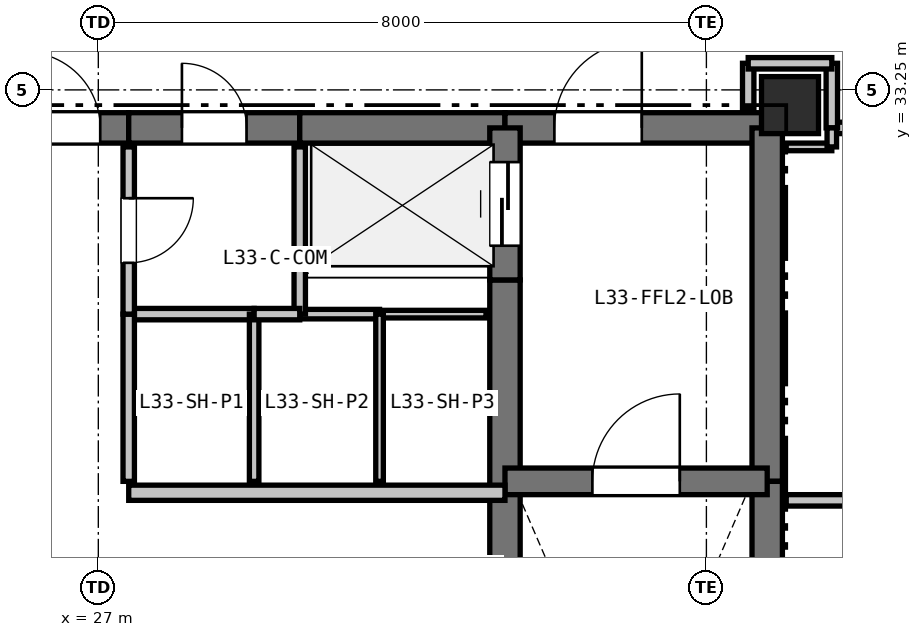
"""IFC4 building model, lengths in metres.
Left out: names, types, materials, properties, quantities, classifications, styles, units other than length and angle.
Written with IfcOpenShell. Run it as: python <this file> out.ifc"""

import sys

from ifc_helpers import new_model, si_unit, direction, frame, frame_2d, origin, origin_2d, place, context, subcontext, project, spatial, rectangle, extrude, element, fill, save


model = new_model("IFC4")
c1 = context("Model", 3, precision=1e-05, world=origin(), true_north=direction((0.0, 1.0)))
c2 = subcontext(c1, "Body", "Model", "MODEL_VIEW")
j1 = project(units=[si_unit("LENGTHUNIT", "METRE"), si_unit("PLANEANGLEUNIT", "RADIAN")], contexts=[c1])
p1 = place(None, origin())
s1 = spatial("IfcSite", under=j1, at=p1, CompositionType="ELEMENT")
p2 = place(p1, origin())
s2 = spatial("IfcBuilding", under=s1, at=p2, CompositionType="ELEMENT")
p3 = place(p2, frame((0.0, 0.0, 121.2)))
s3 = spatial("IfcBuildingStorey", under=s2, at=p3, CompositionType="ELEMENT", Elevation=121.2)
p4 = place(p3, frame((36.1, 33.05, 0.0), z_axis=(0.0, 0.0, 1.0), x_axis=(1.0, 0.0, 0.0)))
e1 = element("IfcColumn", 1, at=p4, inside=s3, PredefinedType="COLUMN", context=c2, shape_type="SweptSolid", body=[
    extrude(rectangle(XDim=0.75, YDim=0.75, at=origin_2d()), origin(), (0.0, 0.0, 1.0), 3.3),
])
p5 = place(p3, frame((25.65, 32.75, 0.0), z_axis=(0.0, 0.0, 1.0), x_axis=(1.0, 0.0, 0.0)))
e2 = element("IfcWall", 2, at=p5, inside=s3, PredefinedType="SHEAR", context=c2, shape_type="SweptSolid", body=[
    extrude(rectangle(XDim=1.75, YDim=0.4, at=frame_2d((0.875, 0.0))), origin(), (0.0, 0.0, 1.0), 3.06),
])
p6 = place(p5, frame((0.375, 0.0, 0.0)))
e3 = element("IfcOpeningElement", 3, at=p6, cuts=e2, PredefinedType="OPENING", context=c2, shape_type="SweptSolid", body=[
    extrude(rectangle(XDim=1.0, YDim=2.15, at=frame_2d((0.5, 1.075))), frame((0.0, 0.21, 0.0), z_axis=(0.0, -1.0, 0.0), x_axis=(1.0, 0.0, 0.0)), (0.0, 0.0, 1.0), 0.42),
])
p7 = place(p3, frame((27.4, 32.75, 0.0), z_axis=(0.0, 0.0, 1.0), x_axis=(1.0, 0.0, 0.0)))
e4 = element("IfcWall", 4, at=p7, inside=s3, PredefinedType="SHEAR", context=c2, shape_type="SweptSolid", body=[
    extrude(rectangle(XDim=2.25, YDim=0.4, at=frame_2d((1.125, 0.0))), origin(), (0.0, 0.0, 1.0), 3.06),
])
p8 = place(p7, frame((0.7, 0.0, 0.0)))
e5 = element("IfcOpeningElement", 5, at=p8, cuts=e4, PredefinedType="OPENING", context=c2, shape_type="SweptSolid", body=[
    extrude(rectangle(XDim=0.85, YDim=2.1, at=frame_2d((0.425, 1.05))), frame((0.0, 0.21, 0.0), z_axis=(0.0, -1.0, 0.0), x_axis=(1.0, 0.0, 0.0)), (0.0, 0.0, 1.0), 0.42),
])
p9 = place(p3, frame((29.65, 32.75, 0.0), z_axis=(0.0, 0.0, 1.0), x_axis=(1.0, 0.0, 0.0)))
e6 = element("IfcWall", 6, at=p9, inside=s3, PredefinedType="SHEAR", context=c2, shape_type="SweptSolid", body=[
    extrude(rectangle(XDim=2.7, YDim=0.4, at=frame_2d((1.35, 0.0))), origin(), (0.0, 0.0, 1.0), 3.06),
])
p10 = place(p3, frame((32.35, 32.75, 0.0), z_axis=(0.0, 0.0, 1.0), x_axis=(1.0, 0.0, 0.0)))
e7 = element("IfcWall", 7, at=p10, inside=s3, PredefinedType="SHEAR", context=c2, shape_type="SweptSolid", body=[
    extrude(rectangle(XDim=3.45, YDim=0.4, at=frame_2d((1.725, 0.0))), origin(), (0.0, 0.0, 1.0), 3.06),
])
p11 = place(p10, frame((0.65, 0.0, 0.0)))
e8 = element("IfcOpeningElement", 8, at=p11, cuts=e7, PredefinedType="OPENING", context=c2, shape_type="SweptSolid", body=[
    extrude(rectangle(XDim=1.15, YDim=2.15, at=frame_2d((0.575, 1.075))), frame((0.0, 0.21, 0.0), z_axis=(0.0, -1.0, 0.0), x_axis=(1.0, 0.0, 0.0)), (0.0, 0.0, 1.0), 0.42),
])
p12 = place(p3, frame((35.8, 32.75, 0.0), z_axis=(0.0, 0.0, 1.0), x_axis=(0.0, -1.0, 0.0)))
e9 = element("IfcWall", 9, at=p12, inside=s3, PredefinedType="SHEAR", context=c2, shape_type="SweptSolid", body=[
    extrude(rectangle(XDim=4.65, YDim=0.4, at=frame_2d((2.325, 0.0))), origin(), (0.0, 0.0, 1.0), 3.06),
])
p13 = place(p3, frame((35.8, 28.1, 0.0), z_axis=(0.0, 0.0, 1.0), x_axis=(0.0, -1.0, 0.0)))
e10 = element("IfcWall", 10, at=p13, inside=s3, PredefinedType="SHEAR", context=c2, shape_type="SweptSolid", body=[
    extrude(rectangle(XDim=7.35, YDim=0.4, at=frame_2d((3.675, 0.0))), origin(), (0.0, 0.0, 1.0), 3.06),
])
p14 = place(p3, frame((32.35, 25.55, 0.0), z_axis=(0.0, 0.0, 1.0), x_axis=(0.0, 1.0, 0.0)))
e11 = element("IfcWall", 11, at=p14, inside=s3, PredefinedType="SHEAR", context=c2, shape_type="SweptSolid", body=[
    extrude(rectangle(XDim=2.4, YDim=0.4, at=frame_2d((1.2, 0.0))), origin(), (0.0, 0.0, 1.0), 3.06),
])
p15 = place(p3, frame((32.35, 27.95, 0.0), z_axis=(0.0, 0.0, 1.0), x_axis=(0.0, 1.0, 0.0)))
e12 = element("IfcWall", 12, at=p15, inside=s3, PredefinedType="SHEAR", context=c2, shape_type="SweptSolid", body=[
    extrude(rectangle(XDim=2.8, YDim=0.4, at=frame_2d((1.4, 0.0))), origin(), (0.0, 0.0, 1.0), 3.06),
])
p16 = place(p3, frame((32.35, 30.75, 0.0), z_axis=(0.0, 0.0, 1.0), x_axis=(0.0, 1.0, 0.0)))
e13 = element("IfcWall", 13, at=p16, inside=s3, PredefinedType="SHEAR", context=c2, shape_type="SweptSolid", body=[
    extrude(rectangle(XDim=2.0, YDim=0.4, at=frame_2d((1.0, 0.0))), origin(), (0.0, 0.0, 1.0), 3.06),
])
p17 = place(p16, frame((0.45, 0.0, 0.0)))
e14 = element("IfcOpeningElement", 14, at=p17, cuts=e13, PredefinedType="OPENING", context=c2, shape_type="SweptSolid", body=[
    extrude(rectangle(XDim=1.1, YDim=2.15, at=frame_2d((0.55, 1.075))), frame((0.0, 0.21, 0.0), z_axis=(0.0, -1.0, 0.0), x_axis=(1.0, 0.0, 0.0)), (0.0, 0.0, 1.0), 0.42),
])
p18 = place(p3, frame((32.35, 28.1, 0.0), z_axis=(0.0, 0.0, 1.0), x_axis=(1.0, 0.0, 0.0)))
e15 = element("IfcWall", 15, at=p18, inside=s3, PredefinedType="SHEAR", context=c2, shape_type="SweptSolid", body=[
    extrude(rectangle(XDim=3.45, YDim=0.35, at=frame_2d((1.725, 0.0))), origin(), (0.0, 0.0, 1.0), 3.06),
])
p19 = place(p18, frame((1.15, 0.0, 0.0)))
e16 = element("IfcOpeningElement", 16, at=p19, cuts=e15, PredefinedType="OPENING", context=c2, shape_type="SweptSolid", body=[
    extrude(rectangle(XDim=1.15, YDim=2.15, at=frame_2d((0.575, 1.075))), frame((0.0, 0.185, 0.0), z_axis=(0.0, -1.0, 0.0), x_axis=(1.0, 0.0, 0.0)), (0.0, 0.0, 1.0), 0.37),
])
p20 = place(p3, frame((27.4, 27.95, 0.0), z_axis=(0.0, 0.0, 1.0), x_axis=(1.0, 0.0, 0.0)))
e17 = element("IfcWall", 17, at=p20, inside=s3, PredefinedType="PARTITIONING", context=c2, shape_type="SweptSolid", body=[
    extrude(rectangle(XDim=4.95, YDim=0.2, at=frame_2d((2.475, 0.0))), origin(), (0.0, 0.0, 1.0), 3.06),
])
p21 = place(p3, frame((32.1, 30.3, 0.0), z_axis=(0.0, 0.0, 1.0), x_axis=(-1.0, 0.0, 0.0)))
e18 = element("IfcWall", 18, at=p21, inside=s3, PredefinedType="PARTITIONING", context=c2, shape_type="SweptSolid", body=[
    extrude(rectangle(XDim=1.4, YDim=0.1, at=frame_2d((0.7, 0.0))), origin(), (0.0, 0.0, 1.0), 3.06),
])
p22 = place(p3, frame((30.7, 30.3, 0.0), z_axis=(0.0, 0.0, 1.0), x_axis=(-1.0, 0.0, 0.0)))
e19 = element("IfcWall", 19, at=p22, inside=s3, PredefinedType="PARTITIONING", context=c2, shape_type="SweptSolid", body=[
    extrude(rectangle(XDim=1.05, YDim=0.125, at=frame_2d((0.525, 0.0))), origin(), (0.0, 0.0, 1.0), 3.06),
])
p23 = place(p3, frame((29.65, 30.3, 0.0), z_axis=(0.0, 0.0, 1.0), x_axis=(0.0, 1.0, 0.0)))
e20 = element("IfcWall", 20, at=p23, inside=s3, PredefinedType="PARTITIONING", context=c2, shape_type="SweptSolid", body=[
    extrude(rectangle(XDim=2.2, YDim=0.15, at=frame_2d((1.1, 0.0))), origin(), (0.0, 0.0, 1.0), 3.06),
])
p24 = place(p3, frame((27.4, 30.3, 0.0), z_axis=(0.0, 0.0, 1.0), x_axis=(1.0, 0.0, 0.0)))
e21 = element("IfcWall", 21, at=p24, inside=s3, PredefinedType="PARTITIONING", context=c2, shape_type="SweptSolid", body=[
    extrude(rectangle(XDim=1.65, YDim=0.15, at=frame_2d((0.825, 0.0))), origin(), (0.0, 0.0, 1.0), 3.06),
])
p25 = place(p3, frame((29.05, 30.3, 0.0), z_axis=(0.0, 0.0, 1.0), x_axis=(0.0, -1.0, 0.0)))
e22 = element("IfcWall", 22, at=p25, inside=s3, PredefinedType="PARTITIONING", context=c2, shape_type="SweptSolid", body=[
    extrude(rectangle(XDim=2.2, YDim=0.125, at=frame_2d((1.1, 0.0))), origin(), (0.0, 0.0, 1.0), 3.06),
])
p26 = place(p3, frame((27.4, 28.1, 0.0), z_axis=(0.0, 0.0, 1.0), x_axis=(0.0, 1.0, 0.0)))
e23 = element("IfcWall", 23, at=p26, inside=s3, PredefinedType="PARTITIONING", context=c2, shape_type="SweptSolid", body=[
    extrude(rectangle(XDim=2.2, YDim=0.15, at=frame_2d((1.1, 0.0))), origin(), (0.0, 0.0, 1.0), 3.06),
])
p27 = place(p3, frame((29.05, 30.3, 0.0), z_axis=(0.0, 0.0, 1.0), x_axis=(1.0, 0.0, 0.0)))
e24 = element("IfcWall", 24, at=p27, inside=s3, PredefinedType="PARTITIONING", context=c2, shape_type="SweptSolid", body=[
    extrude(rectangle(XDim=0.6, YDim=0.15, at=frame_2d((0.3, 0.0))), origin(), (0.0, 0.0, 1.0), 3.06),
])
p28 = place(p3, frame((30.7, 30.3, 0.0), z_axis=(0.0, 0.0, 1.0), x_axis=(0.0, -1.0, 0.0)))
e25 = element("IfcWall", 25, at=p28, inside=s3, PredefinedType="PARTITIONING", context=c2, shape_type="SweptSolid", body=[
    extrude(rectangle(XDim=2.2, YDim=0.1, at=frame_2d((1.1, 0.0))), origin(), (0.0, 0.0, 1.0), 3.06),
])
p29 = place(p3, frame((27.4, 32.5, 0.0), z_axis=(0.0, 0.0, 1.0), x_axis=(0.0, -1.0, 0.0)))
e26 = element("IfcWall", 26, at=p29, inside=s3, PredefinedType="PARTITIONING", context=c2, shape_type="SweptSolid", body=[
    extrude(rectangle(XDim=2.2, YDim=0.15, at=frame_2d((1.1, 0.0))), origin(), (0.0, 0.0, 1.0), 3.06),
])
p30 = place(p29, frame((0.675, 0.0, 0.0)))
e27 = element("IfcOpeningElement", 27, at=p30, cuts=e26, PredefinedType="OPENING", context=c2, shape_type="SweptSolid", body=[
    extrude(rectangle(XDim=0.85, YDim=2.1, at=frame_2d((0.425, 1.05))), frame((0.0, 0.085, 0.0), z_axis=(0.0, -1.0, 0.0), x_axis=(1.0, 0.0, 0.0)), (0.0, 0.0, 1.0), 0.17),
])
p31 = place(p3, frame((35.55, 33.6, 0.0), z_axis=(0.0, 0.0, 1.0), x_axis=(0.0, -1.0, 0.0)))
e28 = element("IfcWall", 28, at=p31, inside=s3, PredefinedType="PARTITIONING", context=c2, shape_type="SweptSolid", body=[
    extrude(rectangle(XDim=0.6, YDim=0.15, at=frame_2d((0.3, 0.0))), origin(), (0.0, 0.0, 1.0), 2.508),
])
p32 = place(p3, frame((39.2, 32.75, 0.0), z_axis=(0.0, 0.0, 1.0), x_axis=(-1.0, 0.0, 0.0)))
e29 = element("IfcWall", 29, at=p32, inside=s3, PredefinedType="PARTITIONING", context=c2, shape_type="SweptSolid", body=[
    extrude(rectangle(XDim=2.55, YDim=0.15, at=frame_2d((1.275, 0.0))), origin(), (0.0, 0.0, 1.0), 3.06),
])
p33 = place(p32, frame((0.775, 0.0, 0.0)))
e30 = element("IfcOpeningElement", 30, at=p33, cuts=e29, PredefinedType="OPENING", context=c2, shape_type="SweptSolid", body=[
    extrude(rectangle(XDim=1.0, YDim=2.15, at=frame_2d((0.5, 1.075))), frame((0.0, 0.085, 0.0), z_axis=(0.0, -1.0, 0.0), x_axis=(1.0, 0.0, 0.0)), (0.0, 0.0, 1.0), 0.17),
])
p34 = place(p3, frame((36.65, 32.75, 0.0), z_axis=(0.0, 0.0, 1.0), x_axis=(0.0, 1.0, 0.0)))
e31 = element("IfcWall", 31, at=p34, inside=s3, PredefinedType="PARTITIONING", context=c2, shape_type="SweptSolid", body=[
    extrude(rectangle(XDim=0.85, YDim=0.15, at=frame_2d((0.425, 0.0))), origin(), (0.0, 0.0, 1.0), 2.433),
])
p35 = place(p3, frame((36.65, 33.6, 0.0), z_axis=(0.0, 0.0, 1.0), x_axis=(-1.0, 0.0, 0.0)))
e32 = element("IfcWall", 32, at=p35, inside=s3, PredefinedType="PARTITIONING", context=c2, shape_type="SweptSolid", body=[
    extrude(rectangle(XDim=1.1, YDim=0.15, at=frame_2d((0.55, 0.0))), origin(), (0.0, 0.0, 1.0), 2.433),
])
p36 = place(p3, frame((36.05, 32.5, 0.0), z_axis=(0.0, 0.0, 1.0), x_axis=(1.0, 0.0, 0.0)))
e33 = element("IfcWall", 33, at=p36, inside=s3, PredefinedType="PARTITIONING", context=c2, shape_type="SweptSolid", body=[
    extrude(rectangle(XDim=0.6, YDim=0.1, at=frame_2d((0.3, 0.0))), origin(), (0.0, 0.0, 1.0), 2.508),
])
p37 = place(p3, frame((36.65, 32.5, 0.0), z_axis=(0.0, 0.0, 1.0), x_axis=(0.0, 1.0, 0.0)))
e34 = element("IfcWall", 34, at=p37, inside=s3, PredefinedType="PARTITIONING", context=c2, shape_type="SweptSolid", body=[
    extrude(rectangle(XDim=0.25, YDim=0.125, at=frame_2d((0.125, 0.0))), origin(), (0.0, 0.0, 1.0), 3.06),
])
p38 = place(p3, frame((42.181, 27.85, 0.0), z_axis=(0.0, 0.0, 1.0), x_axis=(-1.0, 0.0, 0.0)))
e35 = element("IfcWall", 35, at=p38, inside=s3, PredefinedType="PARTITIONING", context=c2, shape_type="SweptSolid", body=[
    extrude(rectangle(XDim=6.131, YDim=0.15, at=frame_2d((3.065, 0.0))), origin(), (0.0, 0.0, 1.0), 2.365),
])
p39 = place(p38, frame((2.641, 0.0, 0.0)))
e36 = element("IfcOpeningElement", 36, at=p39, cuts=e35, PredefinedType="OPENING", context=c2, shape_type="SweptSolid", body=[
    extrude(rectangle(XDim=0.85, YDim=2.1, at=frame_2d((0.425, 1.05))), frame((0.0, 0.085, 0.0), z_axis=(0.0, -1.0, 0.0), x_axis=(1.0, 0.0, 0.0)), (0.0, 0.0, 1.0), 0.17),
])
p40 = place(p6, origin())
e37 = element("IfcDoor", 37, at=p40, inside=s3, OperationType="SINGLE_SWING_LEFT", PredefinedType="DOOR", context=c2, shape_type="SweptSolid", body=[
    extrude(rectangle(XDim=1.0, YDim=2.15, at=frame_2d((0.5, 1.075))), frame((0.0, 0.025, 0.0), z_axis=(0.0, -1.0, 0.0), x_axis=(1.0, 0.0, 0.0)), (0.0, 0.0, 1.0), 0.05),
])
fill(e3, e37)
p41 = place(p17, origin())
e38 = element("IfcDoor", 38, at=p41, inside=s3, OperationType="SLIDING_TO_LEFT", PredefinedType="DOOR", context=c2, shape_type="SweptSolid", body=[
    extrude(rectangle(XDim=1.1, YDim=2.15, at=frame_2d((0.55, 1.075))), frame((0.0, 0.025, 0.0), z_axis=(0.0, -1.0, 0.0), x_axis=(1.0, 0.0, 0.0)), (0.0, 0.0, 1.0), 0.05),
])
fill(e14, e38)
p42 = place(p19, origin())
e39 = element("IfcDoor", 39, at=p42, inside=s3, OperationType="SINGLE_SWING_RIGHT", PredefinedType="DOOR", context=c2, shape_type="SweptSolid", body=[
    extrude(rectangle(XDim=1.15, YDim=2.15, at=frame_2d((0.575, 1.075))), frame((0.0, 0.025, 0.0), z_axis=(0.0, -1.0, 0.0), x_axis=(1.0, 0.0, 0.0)), (0.0, 0.0, 1.0), 0.05),
])
fill(e16, e39)
p43 = place(p11, origin())
e40 = element("IfcDoor", 40, at=p43, inside=s3, OperationType="SINGLE_SWING_RIGHT", PredefinedType="DOOR", context=c2, shape_type="SweptSolid", body=[
    extrude(rectangle(XDim=1.15, YDim=2.15, at=frame_2d((0.575, 1.075))), frame((0.0, 0.025, 0.0), z_axis=(0.0, -1.0, 0.0), x_axis=(1.0, 0.0, 0.0)), (0.0, 0.0, 1.0), 0.05),
])
fill(e8, e40)
p44 = place(p30, origin())
e41 = element("IfcDoor", 41, at=p44, inside=s3, OperationType="SINGLE_SWING_LEFT", PredefinedType="DOOR", context=c2, shape_type="SweptSolid", body=[
    extrude(rectangle(XDim=0.85, YDim=2.1, at=frame_2d((0.425, 1.05))), frame((0.0, 0.025, 0.0), z_axis=(0.0, -1.0, 0.0), x_axis=(1.0, 0.0, 0.0)), (0.0, 0.0, 1.0), 0.05),
])
fill(e27, e41)
p45 = place(p8, origin())
e42 = element("IfcDoor", 42, at=p45, inside=s3, OperationType="SINGLE_SWING_LEFT", PredefinedType="DOOR", context=c2, shape_type="SweptSolid", body=[
    extrude(rectangle(XDim=0.85, YDim=2.1, at=frame_2d((0.425, 1.05))), frame((0.0, 0.025, 0.0), z_axis=(0.0, -1.0, 0.0), x_axis=(1.0, 0.0, 0.0)), (0.0, 0.0, 1.0), 0.05),
])
fill(e5, e42)
save(model, sys.argv[1])
